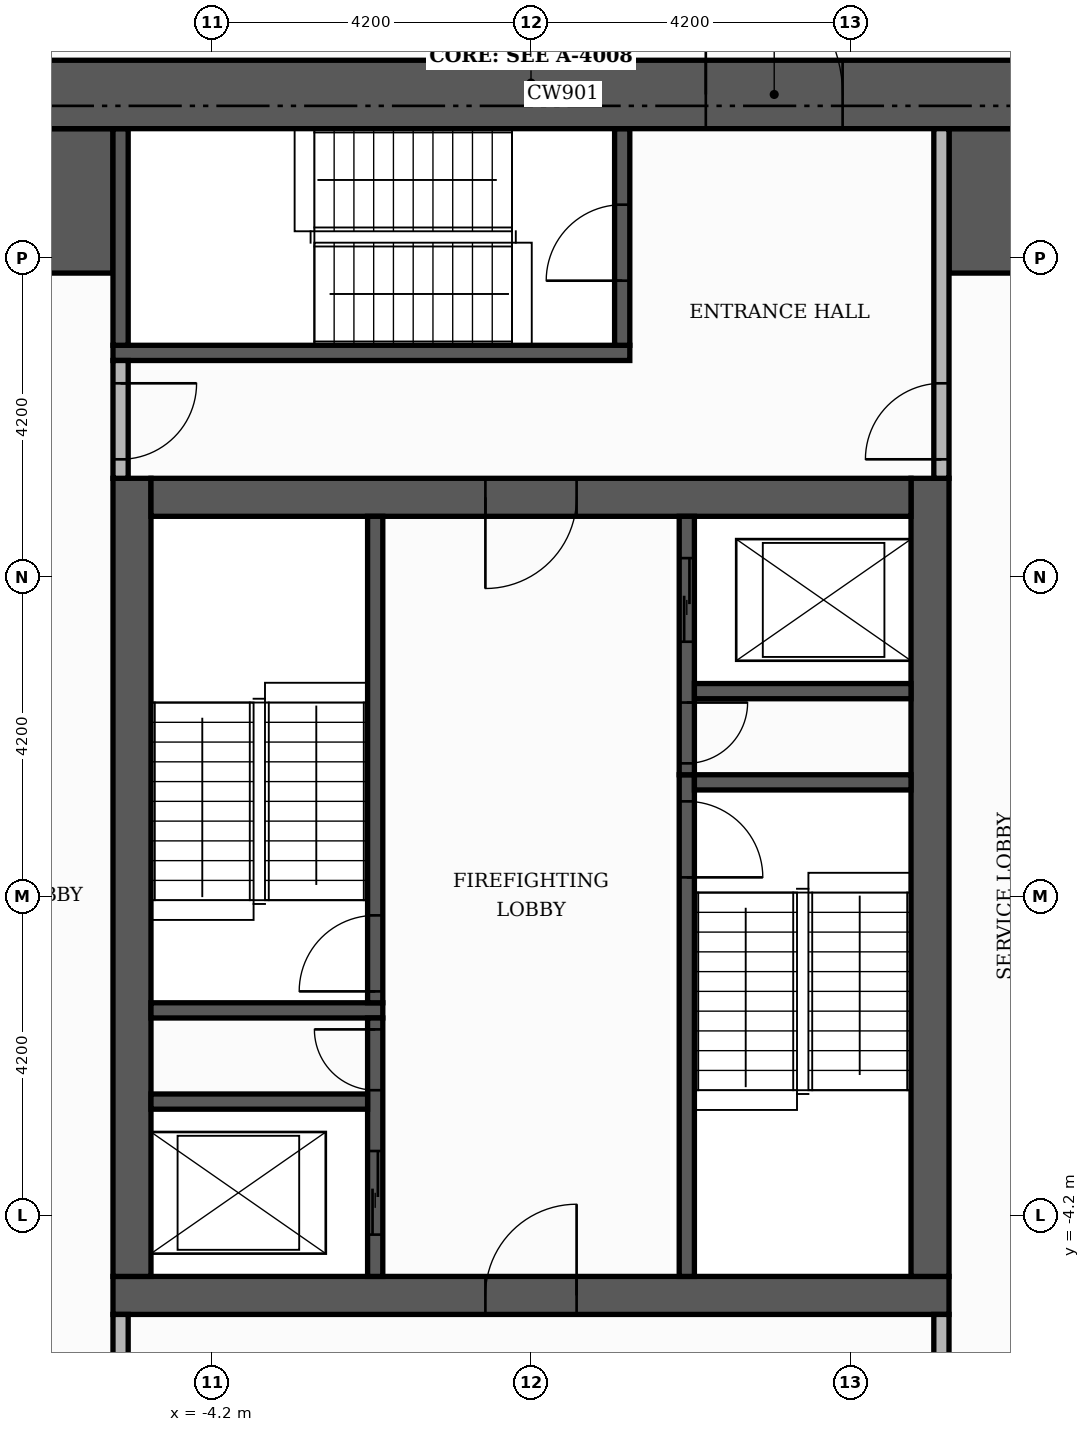
"""IFC4 building model, lengths in metres.
Left out: names, types, materials, properties, quantities, classifications, styles, units other than length and angle.
Written with IfcOpenShell. Run it as: python <this file> out.ifc"""

import sys

from ifc_helpers import new_model, si_unit, direction, frame, frame_2d, origin, place, context, subcontext, project, spatial, rectangle, extrude, element, fill, save


model = new_model("IFC4")
c1 = context("Model", 3, precision=1e-05, world=origin(), true_north=direction((0.0, 1.0)))
c2 = subcontext(c1, "Body", "Model", "MODEL_VIEW")
j1 = project(units=[si_unit("LENGTHUNIT", "METRE"), si_unit("PLANEANGLEUNIT", "RADIAN")], contexts=[c1])
p1 = place(None, origin())
s1 = spatial("IfcSite", under=j1, at=p1, CompositionType="ELEMENT")
p2 = place(p1, origin())
s2 = spatial("IfcBuilding", under=s1, at=p2, CompositionType="ELEMENT")
p3 = place(p2, frame((0.0, 0.0, 30.9)))
s3 = spatial("IfcBuildingStorey", under=s2, at=p3, CompositionType="ELEMENT", Elevation=30.9)
p4 = place(p3, frame((-5.5, -5.25, 0.0), z_axis=(0.0, 0.0, 1.0), x_axis=(1.0, 0.0, 0.0)))
e1 = element("IfcWall", 1, at=p4, inside=s3, PredefinedType="SHEAR", context=c2, shape_type="SweptSolid", body=[
    extrude(rectangle(XDim=11.0, YDim=0.5, at=frame_2d((5.5, 0.0))), origin(), (0.0, 0.0, 1.0), 3.48),
])
p5 = place(p4, frame((4.9, 0.0, 0.0)))
e2 = element("IfcOpeningElement", 2, at=p5, cuts=e1, PredefinedType="OPENING", context=c2, shape_type="SweptSolid", body=[
    extrude(rectangle(XDim=1.2, YDim=2.1, at=frame_2d((0.6, 1.05))), frame((0.0, 0.26, 0.0), z_axis=(0.0, -1.0, 0.0), x_axis=(1.0, 0.0, 0.0)), (0.0, 0.0, 1.0), 0.52),
])
for number, where, z_axis, x_axis in (
    (3, (-5.25, -5.0, 0.0), (0.0, 0.0, 1.0), (0.0, 1.0, 0.0)),
    (4, (5.25, -5.0, 0.0), (0.0, 0.0, 1.0), (0.0, 1.0, 0.0)),
):
    element("IfcWall", number, at=place(p3, frame(where, z_axis=z_axis, x_axis=x_axis)), inside=s3, PredefinedType="SHEAR", context=c2, shape_type="SweptSolid", body=[
        extrude(rectangle(XDim=10.5, YDim=0.5, at=frame_2d((5.25, 0.0))), origin(), (0.0, 0.0, 1.0), 3.48),
    ])
p6 = place(p3, frame((-5.0, 5.25, 0.0), z_axis=(0.0, 0.0, 1.0), x_axis=(1.0, 0.0, 0.0)))
e5 = element("IfcWall", 5, at=p6, inside=s3, PredefinedType="SHEAR", context=c2, shape_type="SweptSolid", body=[
    extrude(rectangle(XDim=10.0, YDim=0.5, at=frame_2d((5.0, 0.0))), origin(), (0.0, 0.0, 1.0), 3.48),
])
p7 = place(p6, frame((4.4, 0.0, 0.0)))
e6 = element("IfcOpeningElement", 6, at=p7, cuts=e5, PredefinedType="OPENING", context=c2, shape_type="SweptSolid", body=[
    extrude(rectangle(XDim=1.2, YDim=2.1, at=frame_2d((0.6, 1.05))), frame((0.0, 0.26, 0.0), z_axis=(0.0, -1.0, 0.0), x_axis=(1.0, 0.0, 0.0)), (0.0, 0.0, 1.0), 0.52),
])
for number, where, z_axis, x_axis in (
    (7, (-10.1, 9.15, 0.0), (0.0, 0.0, 1.0), (1.0, 0.0, 0.0)),
    (8, (5.5, 9.15, 0.0), (0.0, 0.0, 1.0), (1.0, 0.0, 0.0)),
):
    element("IfcWall", number, at=place(p3, frame(where, z_axis=z_axis, x_axis=x_axis)), inside=s3, PredefinedType="SHEAR", context=c2, shape_type="SweptSolid", body=[
        extrude(rectangle(XDim=4.6, YDim=1.9, at=frame_2d((2.3, 0.0))), origin(), (0.0, 0.0, 1.0), 3.48),
    ])
p8 = place(p3, frame((2.05, -5.0, 0.0), z_axis=(0.0, 0.0, 1.0), x_axis=(0.0, 1.0, 0.0)))
e9 = element("IfcWall", 9, at=p8, inside=s3, PredefinedType="SHEAR", context=c2, shape_type="SweptSolid", body=[
    extrude(rectangle(XDim=6.6, YDim=0.2, at=frame_2d((3.3, 0.0))), origin(), (0.0, 0.0, 1.0), 3.48),
])
p9 = place(p8, frame((5.25, 0.0, 0.0)))
e10 = element("IfcOpeningElement", 10, at=p9, cuts=e9, PredefinedType="OPENING", context=c2, shape_type="SweptSolid", body=[
    extrude(rectangle(XDim=1.0, YDim=2.1, at=frame_2d((0.5, 1.05))), frame((0.0, 0.11, 0.0), z_axis=(0.0, -1.0, 0.0), x_axis=(1.0, 0.0, 0.0)), (0.0, 0.0, 1.0), 0.22),
])
p10 = place(p3, frame((-5.0, -1.5, 0.0), z_axis=(0.0, 0.0, 1.0), x_axis=(1.0, 0.0, 0.0)))
e11 = element("IfcWall", 11, at=p10, inside=s3, PredefinedType="SHEAR", context=c2, shape_type="SweptSolid", body=[
    extrude(rectangle(XDim=3.05, YDim=0.2, at=frame_2d((1.525, 0.0))), origin(), (0.0, 0.0, 1.0), 3.48),
])
p11 = place(p3, frame((-2.05, -1.4, 0.0), z_axis=(0.0, 0.0, 1.0), x_axis=(0.0, 1.0, 0.0)))
e12 = element("IfcWall", 12, at=p11, inside=s3, PredefinedType="SHEAR", context=c2, shape_type="SweptSolid", body=[
    extrude(rectangle(XDim=6.4, YDim=0.2, at=frame_2d((3.2, 0.0))), origin(), (0.0, 0.0, 1.0), 3.48),
])
p12 = place(p11, frame((0.15, 0.0, 0.0)))
e13 = element("IfcOpeningElement", 13, at=p12, cuts=e12, PredefinedType="OPENING", context=c2, shape_type="SweptSolid", body=[
    extrude(rectangle(XDim=1.0, YDim=2.1, at=frame_2d((0.5, 1.05))), frame((0.0, 0.11, 0.0), z_axis=(0.0, -1.0, 0.0), x_axis=(1.0, 0.0, 0.0)), (0.0, 0.0, 1.0), 0.22),
])
p13 = place(p3, frame((2.15, 1.5, 0.0), z_axis=(0.0, 0.0, 1.0), x_axis=(1.0, 0.0, 0.0)))
e14 = element("IfcWall", 14, at=p13, inside=s3, PredefinedType="SHEAR", context=c2, shape_type="SweptSolid", body=[
    extrude(rectangle(XDim=2.85, YDim=0.2, at=frame_2d((1.425, 0.0))), origin(), (0.0, 0.0, 1.0), 3.48),
])
p14 = place(p3, frame((-5.5, 7.15, 0.0), z_axis=(0.0, 0.0, 1.0), x_axis=(1.0, 0.0, 0.0)))
e15 = element("IfcWall", 15, at=p14, inside=s3, PredefinedType="SHEAR", context=c2, shape_type="SweptSolid", body=[
    extrude(rectangle(XDim=6.8, YDim=0.2, at=frame_2d((3.4, 0.0))), origin(), (0.0, 0.0, 1.0), 3.48),
])
p15 = place(p3, frame((-5.4, 7.25, 0.0), z_axis=(0.0, 0.0, 1.0), x_axis=(0.0, 1.0, 0.0)))
e16 = element("IfcWall", 16, at=p15, inside=s3, PredefinedType="SHEAR", context=c2, shape_type="SweptSolid", body=[
    extrude(rectangle(XDim=2.85, YDim=0.2, at=frame_2d((1.425, 0.0))), origin(), (0.0, 0.0, 1.0), 3.48),
])
p16 = place(p3, frame((1.2, 7.25, 0.0), z_axis=(0.0, 0.0, 1.0), x_axis=(0.0, 1.0, 0.0)))
e17 = element("IfcWall", 17, at=p16, inside=s3, PredefinedType="SHEAR", context=c2, shape_type="SweptSolid", body=[
    extrude(rectangle(XDim=2.85, YDim=0.2, at=frame_2d((1.425, 0.0))), origin(), (0.0, 0.0, 1.0), 3.48),
])
p17 = place(p16, frame((0.85, 0.0, 0.0)))
e18 = element("IfcOpeningElement", 18, at=p17, cuts=e17, PredefinedType="OPENING", context=c2, shape_type="SweptSolid", body=[
    extrude(rectangle(XDim=1.0, YDim=2.1, at=frame_2d((0.5, 1.05))), frame((0.0, 0.11, 0.0), z_axis=(0.0, -1.0, 0.0), x_axis=(1.0, 0.0, 0.0)), (0.0, 0.0, 1.0), 0.22),
])
p18 = place(p3, frame((-2.05, -5.0, 0.0), z_axis=(0.0, 0.0, 1.0), x_axis=(0.0, 1.0, 0.0)))
e19 = element("IfcWall", 19, at=p18, inside=s3, PredefinedType="SHEAR", context=c2, shape_type="SweptSolid", body=[
    extrude(rectangle(XDim=3.4, YDim=0.2, at=frame_2d((1.7, 0.0))), origin(), (0.0, 0.0, 1.0), 3.48),
])
p19 = place(p18, frame((0.55, 0.0, 0.0)))
e20 = element("IfcOpeningElement", 20, at=p19, cuts=e19, PredefinedType="OPENING", context=c2, shape_type="SweptSolid", body=[
    extrude(rectangle(XDim=1.1, YDim=2.1, at=frame_2d((0.55, 1.05))), frame((0.0, 0.11, 0.0), z_axis=(0.0, -1.0, 0.0), x_axis=(1.0, 0.0, 0.0)), (0.0, 0.0, 1.0), 0.22),
])
p20 = place(p18, frame((2.45, 0.0, 0.0)))
e21 = element("IfcOpeningElement", 21, at=p20, cuts=e19, PredefinedType="OPENING", context=c2, shape_type="SweptSolid", body=[
    extrude(rectangle(XDim=0.8, YDim=2.1, at=frame_2d((0.4, 1.05))), frame((0.0, 0.11, 0.0), z_axis=(0.0, -1.0, 0.0), x_axis=(1.0, 0.0, 0.0)), (0.0, 0.0, 1.0), 0.22),
])
p21 = place(p3, frame((-5.0, -2.7, 0.0), z_axis=(0.0, 0.0, 1.0), x_axis=(1.0, 0.0, 0.0)))
e22 = element("IfcWall", 22, at=p21, inside=s3, PredefinedType="SHEAR", context=c2, shape_type="SweptSolid", body=[
    extrude(rectangle(XDim=2.85, YDim=0.2, at=frame_2d((1.425, 0.0))), origin(), (0.0, 0.0, 1.0), 3.48),
])
p22 = place(p3, frame((2.05, 1.6, 0.0), z_axis=(0.0, 0.0, 1.0), x_axis=(0.0, 1.0, 0.0)))
e23 = element("IfcWall", 23, at=p22, inside=s3, PredefinedType="SHEAR", context=c2, shape_type="SweptSolid", body=[
    extrude(rectangle(XDim=3.4, YDim=0.2, at=frame_2d((1.7, 0.0))), origin(), (0.0, 0.0, 1.0), 3.48),
])
p23 = place(p22, frame((1.75, 0.0, 0.0)))
e24 = element("IfcOpeningElement", 24, at=p23, cuts=e23, PredefinedType="OPENING", context=c2, shape_type="SweptSolid", body=[
    extrude(rectangle(XDim=1.1, YDim=2.1, at=frame_2d((0.55, 1.05))), frame((0.0, 0.11, 0.0), z_axis=(0.0, -1.0, 0.0), x_axis=(1.0, 0.0, 0.0)), (0.0, 0.0, 1.0), 0.22),
])
p24 = place(p22, frame((0.15, 0.0, 0.0)))
e25 = element("IfcOpeningElement", 25, at=p24, cuts=e23, PredefinedType="OPENING", context=c2, shape_type="SweptSolid", body=[
    extrude(rectangle(XDim=0.8, YDim=2.1, at=frame_2d((0.4, 1.05))), frame((0.0, 0.11, 0.0), z_axis=(0.0, -1.0, 0.0), x_axis=(1.0, 0.0, 0.0)), (0.0, 0.0, 1.0), 0.22),
])
p25 = place(p3, frame((2.15, 2.7, 0.0), z_axis=(0.0, 0.0, 1.0), x_axis=(1.0, 0.0, 0.0)))
e26 = element("IfcWall", 26, at=p25, inside=s3, PredefinedType="SHEAR", context=c2, shape_type="SweptSolid", body=[
    extrude(rectangle(XDim=2.85, YDim=0.2, at=frame_2d((1.425, 0.0))), origin(), (0.0, 0.0, 1.0), 3.48),
])
p26 = place(p3, frame((-11.0, 10.55, 0.0), z_axis=(0.0, 0.0, 1.0), x_axis=(1.0, 0.0, 0.0)))
e27 = element("IfcWall", 27, at=p26, inside=s3, PredefinedType="SHEAR", context=c2, shape_type="SweptSolid", body=[
    extrude(rectangle(XDim=22.0, YDim=0.9, at=frame_2d((11.0, 0.0))), origin(), (0.0, 0.0, 1.0), 3.48),
])
p27 = place(p26, frame((13.3, 0.0, 0.0)))
e28 = element("IfcOpeningElement", 28, at=p27, cuts=e27, PredefinedType="OPENING", context=c2, shape_type="SweptSolid", body=[
    extrude(rectangle(XDim=1.8, YDim=2.2, at=frame_2d((0.9, 1.1))), frame((0.0, 0.46, 0.0), z_axis=(0.0, -1.0, 0.0), x_axis=(1.0, 0.0, 0.0)), (0.0, 0.0, 1.0), 0.92),
])
p28 = place(p3, frame((-5.4, -10.1, 0.0), z_axis=(0.0, 0.0, 1.0), x_axis=(0.0, 1.0, 0.0)))
e29 = element("IfcWall", 29, at=p28, inside=s3, PredefinedType="PARTITIONING", context=c2, shape_type="SweptSolid", body=[
    extrude(rectangle(XDim=4.6, YDim=0.2, at=frame_2d((2.3, 0.0))), origin(), (0.0, 0.0, 1.0), 3.48),
])
p29 = place(p28, frame((2.9, 0.0, 0.0)))
e30 = element("IfcOpeningElement", 30, at=p29, cuts=e29, PredefinedType="OPENING", context=c2, shape_type="SweptSolid", body=[
    extrude(rectangle(XDim=1.0, YDim=2.1, at=frame_2d((0.5, 1.05))), frame((0.0, 0.11, 0.0), z_axis=(0.0, -1.0, 0.0), x_axis=(1.0, 0.0, 0.0)), (0.0, 0.0, 1.0), 0.22),
])
p30 = place(p3, frame((5.4, -7.9, 0.0), z_axis=(0.0, 0.0, 1.0), x_axis=(0.0, 1.0, 0.0)))
e31 = element("IfcWall", 31, at=p30, inside=s3, PredefinedType="PARTITIONING", context=c2, shape_type="SweptSolid", body=[
    extrude(rectangle(XDim=2.4, YDim=0.2, at=frame_2d((1.2, 0.0))), origin(), (0.0, 0.0, 1.0), 3.48),
])
p31 = place(p30, frame((0.7, 0.0, 0.0)))
e32 = element("IfcOpeningElement", 32, at=p31, cuts=e31, PredefinedType="OPENING", context=c2, shape_type="SweptSolid", body=[
    extrude(rectangle(XDim=1.0, YDim=2.1, at=frame_2d((0.5, 1.05))), frame((0.0, 0.11, 0.0), z_axis=(0.0, -1.0, 0.0), x_axis=(1.0, 0.0, 0.0)), (0.0, 0.0, 1.0), 0.22),
])
p32 = place(p3, frame((-5.4, 5.5, 0.0), z_axis=(0.0, 0.0, 1.0), x_axis=(0.0, 1.0, 0.0)))
e33 = element("IfcWall", 33, at=p32, inside=s3, PredefinedType="PARTITIONING", context=c2, shape_type="SweptSolid", body=[
    extrude(rectangle(XDim=1.55, YDim=0.2, at=frame_2d((0.775, 0.0))), origin(), (0.0, 0.0, 1.0), 3.48),
])
p33 = place(p32, frame((0.25, 0.0, 0.0)))
e34 = element("IfcOpeningElement", 34, at=p33, cuts=e33, PredefinedType="OPENING", context=c2, shape_type="SweptSolid", body=[
    extrude(rectangle(XDim=1.0, YDim=2.1, at=frame_2d((0.5, 1.05))), frame((0.0, 0.11, 0.0), z_axis=(0.0, -1.0, 0.0), x_axis=(1.0, 0.0, 0.0)), (0.0, 0.0, 1.0), 0.22),
])
p34 = place(p3, frame((5.4, 5.5, 0.0), z_axis=(0.0, 0.0, 1.0), x_axis=(0.0, 1.0, 0.0)))
e35 = element("IfcWall", 35, at=p34, inside=s3, PredefinedType="PARTITIONING", context=c2, shape_type="SweptSolid", body=[
    extrude(rectangle(XDim=4.6, YDim=0.2, at=frame_2d((2.3, 0.0))), origin(), (0.0, 0.0, 1.0), 3.48),
])
p35 = place(p34, frame((0.25, 0.0, 0.0)))
e36 = element("IfcOpeningElement", 36, at=p35, cuts=e35, PredefinedType="OPENING", context=c2, shape_type="SweptSolid", body=[
    extrude(rectangle(XDim=1.0, YDim=2.1, at=frame_2d((0.5, 1.05))), frame((0.0, 0.11, 0.0), z_axis=(0.0, -1.0, 0.0), x_axis=(1.0, 0.0, 0.0)), (0.0, 0.0, 1.0), 0.22),
])
p36 = place(p23, origin())
e37 = element("IfcDoor", 37, at=p36, inside=s3, OperationType="SLIDING_TO_LEFT", PredefinedType="DOOR", context=c2, shape_type="SweptSolid", body=[
    extrude(rectangle(XDim=1.1, YDim=2.1, at=frame_2d((0.55, 1.05))), frame((0.0, 0.025, 0.0), z_axis=(0.0, -1.0, 0.0), x_axis=(1.0, 0.0, 0.0)), (0.0, 0.0, 1.0), 0.05),
])
fill(e24, e37)
p37 = place(p19, origin())
e38 = element("IfcDoor", 38, at=p37, inside=s3, OperationType="SLIDING_TO_LEFT", PredefinedType="DOOR", context=c2, shape_type="SweptSolid", body=[
    extrude(rectangle(XDim=1.1, YDim=2.1, at=frame_2d((0.55, 1.05))), frame((0.0, 0.025, 0.0), z_axis=(0.0, -1.0, 0.0), x_axis=(1.0, 0.0, 0.0)), (0.0, 0.0, 1.0), 0.05),
])
fill(e20, e38)
p38 = place(p12, origin())
e39 = element("IfcDoor", 39, at=p38, inside=s3, OperationType="SINGLE_SWING_LEFT", PredefinedType="DOOR", context=c2, shape_type="SweptSolid", body=[
    extrude(rectangle(XDim=1.0, YDim=2.1, at=frame_2d((0.5, 1.05))), frame((0.0, 0.025, 0.0), z_axis=(0.0, -1.0, 0.0), x_axis=(1.0, 0.0, 0.0)), (0.0, 0.0, 1.0), 0.05),
])
fill(e13, e39)
p39 = place(p9, frame((1.0, 0.0, 0.0), z_axis=(0.0, 0.0, 1.0), x_axis=(-1.0, 0.0, 0.0)))
e40 = element("IfcDoor", 40, at=p39, inside=s3, OperationType="SINGLE_SWING_LEFT", PredefinedType="DOOR", context=c2, shape_type="SweptSolid", body=[
    extrude(rectangle(XDim=1.0, YDim=2.1, at=frame_2d((0.5, 1.05))), frame((0.0, 0.025, 0.0), z_axis=(0.0, -1.0, 0.0), x_axis=(1.0, 0.0, 0.0)), (0.0, 0.0, 1.0), 0.05),
])
fill(e10, e40)
p40 = place(p24, frame((0.8, 0.0, 0.0), z_axis=(0.0, 0.0, 1.0), x_axis=(-1.0, 0.0, 0.0)))
e41 = element("IfcDoor", 41, at=p40, inside=s3, OperationType="SINGLE_SWING_RIGHT", PredefinedType="DOOR", context=c2, shape_type="SweptSolid", body=[
    extrude(rectangle(XDim=0.8, YDim=2.1, at=frame_2d((0.4, 1.05))), frame((0.0, 0.025, 0.0), z_axis=(0.0, -1.0, 0.0), x_axis=(1.0, 0.0, 0.0)), (0.0, 0.0, 1.0), 0.05),
])
fill(e25, e41)
p41 = place(p20, origin())
e42 = element("IfcDoor", 42, at=p41, inside=s3, OperationType="SINGLE_SWING_RIGHT", PredefinedType="DOOR", context=c2, shape_type="SweptSolid", body=[
    extrude(rectangle(XDim=0.8, YDim=2.1, at=frame_2d((0.4, 1.05))), frame((0.0, 0.025, 0.0), z_axis=(0.0, -1.0, 0.0), x_axis=(1.0, 0.0, 0.0)), (0.0, 0.0, 1.0), 0.05),
])
fill(e21, e42)
p42 = place(p7, frame((1.2, 0.0, 0.0), z_axis=(0.0, 0.0, 1.0), x_axis=(-1.0, 0.0, 0.0)))
e43 = element("IfcDoor", 43, at=p42, inside=s3, OperationType="SINGLE_SWING_LEFT", PredefinedType="DOOR", context=c2, shape_type="SweptSolid", body=[
    extrude(rectangle(XDim=1.2, YDim=2.1, at=frame_2d((0.6, 1.05))), frame((0.0, 0.025, 0.0), z_axis=(0.0, -1.0, 0.0), x_axis=(1.0, 0.0, 0.0)), (0.0, 0.0, 1.0), 0.05),
])
fill(e6, e43)
p43 = place(p5, origin())
e44 = element("IfcDoor", 44, at=p43, inside=s3, OperationType="SINGLE_SWING_RIGHT", PredefinedType="DOOR", context=c2, shape_type="SweptSolid", body=[
    extrude(rectangle(XDim=1.2, YDim=2.1, at=frame_2d((0.6, 1.05))), frame((0.0, 0.025, 0.0), z_axis=(0.0, -1.0, 0.0), x_axis=(1.0, 0.0, 0.0)), (0.0, 0.0, 1.0), 0.05),
])
fill(e2, e44)
p44 = place(p17, origin())
e45 = element("IfcDoor", 45, at=p44, inside=s3, OperationType="SINGLE_SWING_LEFT", PredefinedType="DOOR", context=c2, shape_type="SweptSolid", body=[
    extrude(rectangle(XDim=1.0, YDim=2.1, at=frame_2d((0.5, 1.05))), frame((0.0, 0.025, 0.0), z_axis=(0.0, -1.0, 0.0), x_axis=(1.0, 0.0, 0.0)), (0.0, 0.0, 1.0), 0.05),
])
fill(e18, e45)
p45 = place(p33, frame((1.0, 0.0, 0.0), z_axis=(0.0, 0.0, 1.0), x_axis=(-1.0, 0.0, 0.0)))
e46 = element("IfcDoor", 46, at=p45, inside=s3, OperationType="SINGLE_SWING_RIGHT", PredefinedType="DOOR", context=c2, shape_type="SweptSolid", body=[
    extrude(rectangle(XDim=1.0, YDim=2.1, at=frame_2d((0.5, 1.05))), frame((0.0, 0.025, 0.0), z_axis=(0.0, -1.0, 0.0), x_axis=(1.0, 0.0, 0.0)), (0.0, 0.0, 1.0), 0.05),
])
fill(e34, e46)
p46 = place(p35, origin())
e47 = element("IfcDoor", 47, at=p46, inside=s3, OperationType="SINGLE_SWING_LEFT", PredefinedType="DOOR", context=c2, shape_type="SweptSolid", body=[
    extrude(rectangle(XDim=1.0, YDim=2.1, at=frame_2d((0.5, 1.05))), frame((0.0, 0.025, 0.0), z_axis=(0.0, -1.0, 0.0), x_axis=(1.0, 0.0, 0.0)), (0.0, 0.0, 1.0), 0.05),
])
fill(e36, e47)
p47 = place(p27, origin())
e48 = element("IfcDoor", 48, at=p47, inside=s3, OperationType="DOUBLE_DOOR_SINGLE_SWING", PredefinedType="DOOR", context=c2, shape_type="SweptSolid", body=[
    extrude(rectangle(XDim=1.8, YDim=2.2, at=frame_2d((0.9, 1.1))), frame((0.0, 0.025, 0.0), z_axis=(0.0, -1.0, 0.0), x_axis=(1.0, 0.0, 0.0)), (0.0, 0.0, 1.0), 0.05),
])
fill(e28, e48)
save(model, sys.argv[1])
